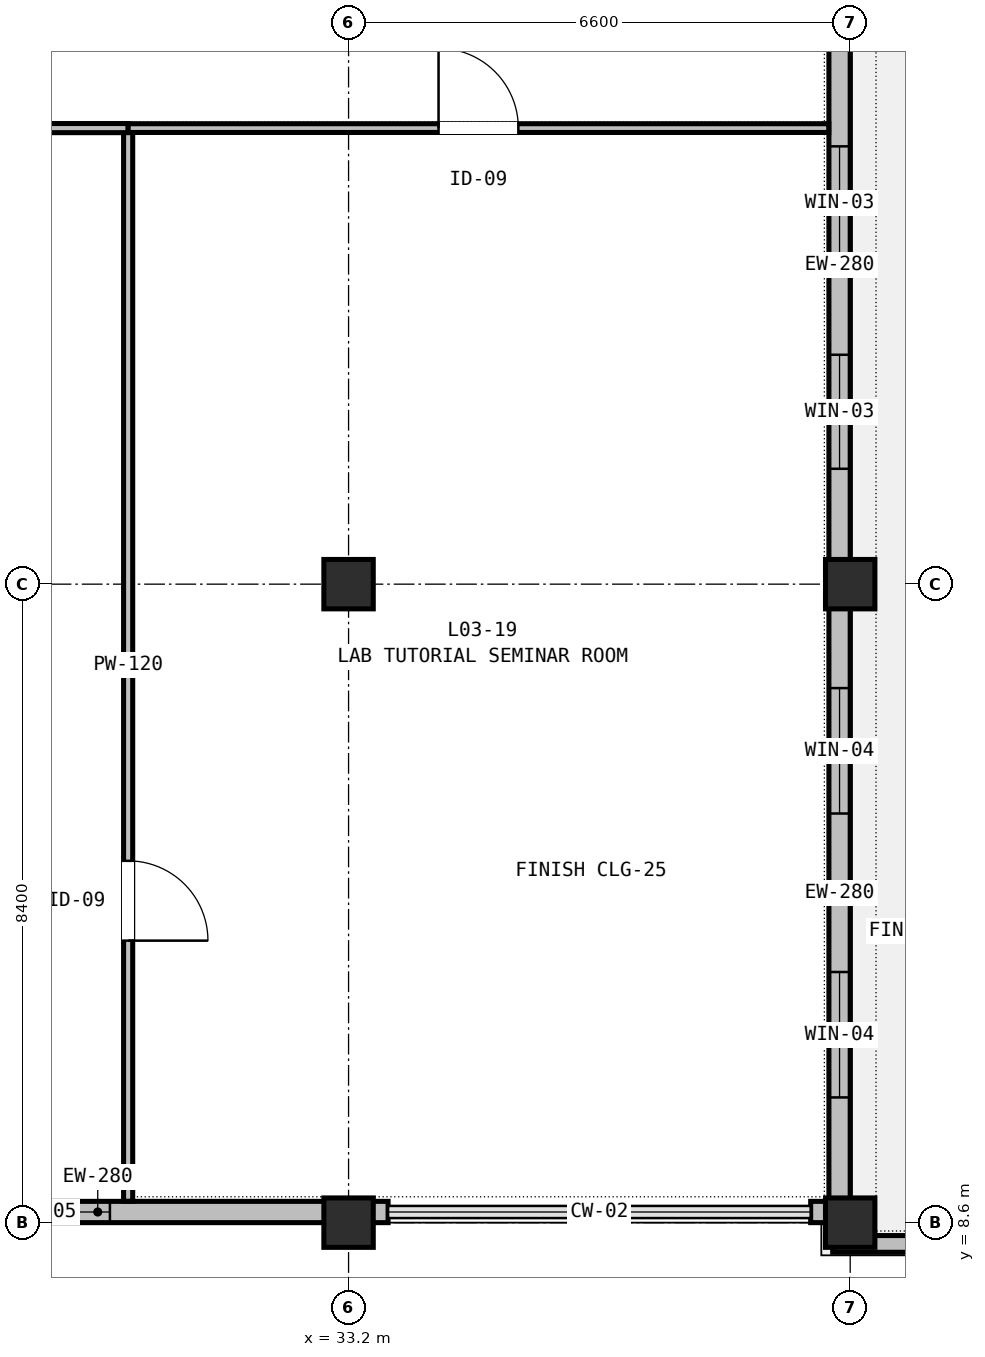
"""IFC4 building model, lengths in metres.
Left out: names, types, materials, properties, quantities, classifications, styles, units other than length and angle.
Written with IfcOpenShell. Run it as: python <this file> out.ifc"""

import sys

from ifc_helpers import new_model, si_unit, direction, frame, frame_2d, origin, origin_2d, place, context, subcontext, project, spatial, rectangle, extrude, element, fill, save


model = new_model("IFC4")
c1 = context("Model", 3, precision=1e-05, world=origin(), true_north=direction((0.0, 1.0)))
c2 = subcontext(c1, "Body", "Model", "MODEL_VIEW")
j1 = project(units=[si_unit("LENGTHUNIT", "METRE"), si_unit("PLANEANGLEUNIT", "RADIAN")], contexts=[c1])
p1 = place(None, origin())
s1 = spatial("IfcSite", under=j1, at=p1, CompositionType="ELEMENT")
p2 = place(p1, origin())
s2 = spatial("IfcBuilding", under=s1, at=p2, CompositionType="ELEMENT")
p3 = place(p2, frame((0.0, 0.0, 15.0)))
s3 = spatial("IfcBuildingStorey", under=s2, at=p3, CompositionType="ELEMENT", Elevation=15.0)
p4 = place(p3, frame((33.2, 8.6, 0.0), z_axis=(0.0, 0.0, 1.0), x_axis=(1.0, 0.0, 0.0)))
e1 = element("IfcColumn", 1, at=p4, inside=s3, PredefinedType="COLUMN", context=c2, shape_type="SweptSolid", body=[
    extrude(rectangle(XDim=0.65, YDim=0.65, at=origin_2d()), origin(), (0.0, 0.0, 1.0), 4.44),
])
p5 = place(p3, frame((33.2, 17.0, 0.0), z_axis=(0.0, 0.0, 1.0), x_axis=(1.0, 0.0, 0.0)))
e2 = element("IfcColumn", 2, at=p5, inside=s3, PredefinedType="COLUMN", context=c2, shape_type="SweptSolid", body=[
    extrude(rectangle(XDim=0.65, YDim=0.65, at=origin_2d()), origin(), (0.0, 0.0, 1.0), 4.5),
])
p6 = place(p3, frame((39.8, 8.6, 0.0), z_axis=(0.0, 0.0, 1.0), x_axis=(1.0, 0.0, 0.0)))
e3 = element("IfcColumn", 3, at=p6, inside=s3, PredefinedType="COLUMN", context=c2, shape_type="SweptSolid", body=[
    extrude(rectangle(XDim=0.65, YDim=0.65, at=origin_2d()), origin(), (0.0, 0.0, 1.0), 4.44),
])
p7 = place(p3, frame((39.8, 17.0, 0.0), z_axis=(0.0, 0.0, 1.0), x_axis=(1.0, 0.0, 0.0)))
e4 = element("IfcColumn", 4, at=p7, inside=s3, PredefinedType="COLUMN", context=c2, shape_type="SweptSolid", body=[
    extrude(rectangle(XDim=0.65, YDim=0.65, at=origin_2d()), origin(), (0.0, 0.0, 1.0), 4.5),
])
p8 = place(p3, frame((39.66, 25.4, 0.0), z_axis=(0.0, 0.0, 1.0), x_axis=(0.0, -1.0, 0.0)))
e5 = element("IfcWall", 5, at=p8, inside=s3, PredefinedType="STANDARD", context=c2, shape_type="SweptSolid", body=[
    extrude(rectangle(XDim=8.4, YDim=0.28, at=frame_2d((4.2, 0.0))), origin(), (0.0, 0.0, 1.0), 3.735),
])
p9 = place(p8, frame((2.64, 0.0, 0.9)))
e6 = element("IfcOpeningElement", 6, at=p9, cuts=e5, PredefinedType="OPENING", context=c2, shape_type="SweptSolid", body=[
    extrude(rectangle(XDim=1.5, YDim=2.1, at=frame_2d((0.75, 1.05))), frame((0.0, 0.15, 0.0), z_axis=(0.0, -1.0, 0.0), x_axis=(1.0, 0.0, 0.0)), (0.0, 0.0, 1.0), 0.3),
])
p10 = place(p8, frame((5.382, 0.0, 0.9)))
e7 = element("IfcOpeningElement", 7, at=p10, cuts=e5, PredefinedType="OPENING", context=c2, shape_type="SweptSolid", body=[
    extrude(rectangle(XDim=1.5, YDim=2.1, at=frame_2d((0.75, 1.05))), frame((0.0, 0.15, 0.0), z_axis=(0.0, -1.0, 0.0), x_axis=(1.0, 0.0, 0.0)), (0.0, 0.0, 1.0), 0.3),
])
p11 = place(p3, frame((39.66, 17.0, 0.0), z_axis=(0.0, 0.0, 1.0), x_axis=(0.0, -1.0, 0.0)))
e8 = element("IfcWall", 8, at=p11, inside=s3, PredefinedType="STANDARD", context=c2, shape_type="SweptSolid", body=[
    extrude(rectangle(XDim=8.12, YDim=0.28, at=frame_2d((4.06, 0.0))), origin(), (0.0, 0.0, 1.0), 3.735),
])
p12 = place(p11, frame((1.367, 0.0, 0.9)))
e9 = element("IfcOpeningElement", 9, at=p12, cuts=e8, PredefinedType="OPENING", context=c2, shape_type="SweptSolid", body=[
    extrude(rectangle(XDim=1.65, YDim=2.1, at=frame_2d((0.825, 1.05))), frame((0.0, 0.15, 0.0), z_axis=(0.0, -1.0, 0.0), x_axis=(1.0, 0.0, 0.0)), (0.0, 0.0, 1.0), 0.3),
])
p13 = place(p11, frame((5.103, 0.0, 0.9)))
e10 = element("IfcOpeningElement", 10, at=p13, cuts=e8, PredefinedType="OPENING", context=c2, shape_type="SweptSolid", body=[
    extrude(rectangle(XDim=1.65, YDim=2.1, at=frame_2d((0.825, 1.05))), frame((0.0, 0.15, 0.0), z_axis=(0.0, -1.0, 0.0), x_axis=(1.0, 0.0, 0.0)), (0.0, 0.0, 1.0), 0.3),
])
for number, where, z_axis, x_axis in (
    (11, (39.8, 8.74, 0.0), (0.0, 0.0, 1.0), (-1.0, 0.0, 0.0)),
    (12, (33.72, 8.74, 0.0), (0.0, 0.0, 1.0), (-1.0, 0.0, 0.0)),
):
    element("IfcWall", number, at=place(p3, frame(where, z_axis=z_axis, x_axis=x_axis)), inside=s3, PredefinedType="STANDARD", context=c2, shape_type="SweptSolid", body=[
        extrude(rectangle(XDim=0.52, YDim=0.28, at=frame_2d((0.26, 0.0))), origin(), (0.0, 0.0, 1.0), 3.735),
    ])
p14 = place(p3, frame((33.2, 8.74, 0.0), z_axis=(0.0, 0.0, 1.0), x_axis=(-1.0, 0.0, 0.0)))
e13 = element("IfcWall", 13, at=p14, inside=s3, PredefinedType="STANDARD", context=c2, shape_type="SweptSolid", body=[
    extrude(rectangle(XDim=6.6, YDim=0.28, at=frame_2d((3.3, 0.0))), origin(), (0.0, 0.0, 1.0), 3.735),
])
p15 = place(p14, frame((3.14, 0.0, 0.9)))
e14 = element("IfcOpeningElement", 14, at=p15, cuts=e13, PredefinedType="OPENING", context=c2, shape_type="SweptSolid", body=[
    extrude(rectangle(XDim=1.8, YDim=2.1, at=frame_2d((0.9, 1.05))), frame((0.0, 0.15, 0.0), z_axis=(0.0, -1.0, 0.0), x_axis=(1.0, 0.0, 0.0)), (0.0, 0.0, 1.0), 0.3),
])
p16 = place(p3, frame((46.68, 8.32, 0.0), z_axis=(0.0, 0.0, 1.0), x_axis=(-1.0, 0.0, 0.0)))
e15 = element("IfcWall", 15, at=p16, inside=s3, PredefinedType="PARAPET", context=c2, shape_type="SweptSolid", body=[
    extrude(rectangle(XDim=7.11, YDim=0.22, at=frame_2d((3.555, 0.0))), origin(), (0.0, 0.0, 1.0), 0.68),
])
p17 = place(p3, frame((30.3, 23.0, 0.0), z_axis=(0.0, 0.0, 1.0), x_axis=(0.0, -1.0, 0.0)))
e16 = element("IfcWall", 16, at=p17, inside=s3, PredefinedType="PARTITIONING", context=c2, shape_type="SweptSolid", body=[
    extrude(rectangle(XDim=14.118, YDim=0.12, at=frame_2d((7.059, 0.0))), origin(), (0.0, 0.0, 1.0), 3.735),
])
p18 = place(p17, frame((9.64, 0.0, 0.0)))
e17 = element("IfcOpeningElement", 17, at=p18, cuts=e16, PredefinedType="OPENING", context=c2, shape_type="SweptSolid", body=[
    extrude(rectangle(XDim=1.05, YDim=2.06, at=frame_2d((0.525, 1.03))), frame((0.0, 0.07, 0.0), z_axis=(0.0, -1.0, 0.0), x_axis=(1.0, 0.0, 0.0)), (0.0, 0.0, 1.0), 0.14),
])
p19 = place(p3, frame((18.3, 23.0, 0.0), z_axis=(0.0, 0.0, 1.0), x_axis=(1.0, 0.0, 0.0)))
e18 = element("IfcWall", 18, at=p19, inside=s3, PredefinedType="PARTITIONING", context=c2, shape_type="SweptSolid", body=[
    extrude(rectangle(XDim=12.0, YDim=0.12, at=frame_2d((6.0, 0.0))), origin(), (0.0, 0.0, 1.0), 3.735),
])
p20 = place(p19, frame((5.5, 0.0, 0.0)))
e19 = element("IfcOpeningElement", 19, at=p20, cuts=e18, PredefinedType="OPENING", context=c2, shape_type="SweptSolid", body=[
    extrude(rectangle(XDim=1.0, YDim=2.06, at=frame_2d((0.5, 1.03))), frame((0.0, 0.07, 0.0), z_axis=(0.0, -1.0, 0.0), x_axis=(1.0, 0.0, 0.0)), (0.0, 0.0, 1.0), 0.14),
])
p21 = place(p3, frame((30.3, 23.0, 0.0), z_axis=(0.0, 0.0, 1.0), x_axis=(1.0, 0.0, 0.0)))
e20 = element("IfcWall", 20, at=p21, inside=s3, PredefinedType="PARTITIONING", context=c2, shape_type="SweptSolid", body=[
    extrude(rectangle(XDim=9.218, YDim=0.115, at=frame_2d((4.609, 0.0))), origin(), (0.0, 0.0, 1.0), 3.735),
])
p22 = place(p21, frame((4.084, 0.0, 0.0)))
e21 = element("IfcOpeningElement", 21, at=p22, cuts=e20, PredefinedType="OPENING", context=c2, shape_type="SweptSolid", body=[
    extrude(rectangle(XDim=1.05, YDim=2.06, at=frame_2d((0.525, 1.03))), frame((0.0, 0.067, 0.0), z_axis=(0.0, -1.0, 0.0), x_axis=(1.0, 0.0, 0.0)), (0.0, 0.0, 1.0), 0.135),
])
p23 = place(p9, origin())
e22 = element("IfcWindow", 22, at=p23, inside=s3, PartitioningType="SINGLE_PANEL", PredefinedType="WINDOW", context=c2, shape_type="SweptSolid", body=[
    extrude(rectangle(XDim=1.5, YDim=2.1, at=frame_2d((0.75, 1.05))), frame((0.0, 0.03, 0.0), z_axis=(0.0, -1.0, 0.0), x_axis=(1.0, 0.0, 0.0)), (0.0, 0.0, 1.0), 0.06),
])
fill(e6, e22)
p24 = place(p10, origin())
e23 = element("IfcWindow", 23, at=p24, inside=s3, PartitioningType="SINGLE_PANEL", PredefinedType="WINDOW", context=c2, shape_type="SweptSolid", body=[
    extrude(rectangle(XDim=1.5, YDim=2.1, at=frame_2d((0.75, 1.05))), frame((0.0, 0.03, 0.0), z_axis=(0.0, -1.0, 0.0), x_axis=(1.0, 0.0, 0.0)), (0.0, 0.0, 1.0), 0.06),
])
fill(e7, e23)
p25 = place(p12, origin())
e24 = element("IfcWindow", 24, at=p25, inside=s3, PartitioningType="SINGLE_PANEL", PredefinedType="WINDOW", context=c2, shape_type="SweptSolid", body=[
    extrude(rectangle(XDim=1.65, YDim=2.1, at=frame_2d((0.825, 1.05))), frame((0.0, 0.03, 0.0), z_axis=(0.0, -1.0, 0.0), x_axis=(1.0, 0.0, 0.0)), (0.0, 0.0, 1.0), 0.06),
])
fill(e9, e24)
p26 = place(p13, origin())
e25 = element("IfcWindow", 25, at=p26, inside=s3, PartitioningType="SINGLE_PANEL", PredefinedType="WINDOW", context=c2, shape_type="SweptSolid", body=[
    extrude(rectangle(XDim=1.65, YDim=2.1, at=frame_2d((0.825, 1.05))), frame((0.0, 0.03, 0.0), z_axis=(0.0, -1.0, 0.0), x_axis=(1.0, 0.0, 0.0)), (0.0, 0.0, 1.0), 0.06),
])
fill(e10, e25)
p27 = place(p15, origin())
e26 = element("IfcWindow", 26, at=p27, inside=s3, PartitioningType="SINGLE_PANEL", PredefinedType="WINDOW", context=c2, shape_type="SweptSolid", body=[
    extrude(rectangle(XDim=1.8, YDim=2.1, at=frame_2d((0.9, 1.05))), frame((0.0, 0.03, 0.0), z_axis=(0.0, -1.0, 0.0), x_axis=(1.0, 0.0, 0.0)), (0.0, 0.0, 1.0), 0.06),
])
fill(e14, e26)
p28 = place(p22, origin())
e27 = element("IfcDoor", 27, at=p28, inside=s3, OperationType="SINGLE_SWING_LEFT", PredefinedType="DOOR", context=c2, shape_type="SweptSolid", body=[
    extrude(rectangle(XDim=1.05, YDim=2.06, at=frame_2d((0.525, 1.03))), frame((0.0, 0.025, 0.0), z_axis=(0.0, -1.0, 0.0), x_axis=(1.0, 0.0, 0.0)), (0.0, 0.0, 1.0), 0.05),
])
fill(e21, e27)
p29 = place(p18, origin())
e28 = element("IfcDoor", 28, at=p29, inside=s3, OperationType="SINGLE_SWING_RIGHT", PredefinedType="DOOR", context=c2, shape_type="SweptSolid", body=[
    extrude(rectangle(XDim=1.05, YDim=2.06, at=frame_2d((0.525, 1.03))), frame((0.0, 0.025, 0.0), z_axis=(0.0, -1.0, 0.0), x_axis=(1.0, 0.0, 0.0)), (0.0, 0.0, 1.0), 0.05),
])
fill(e17, e28)
save(model, sys.argv[1])
